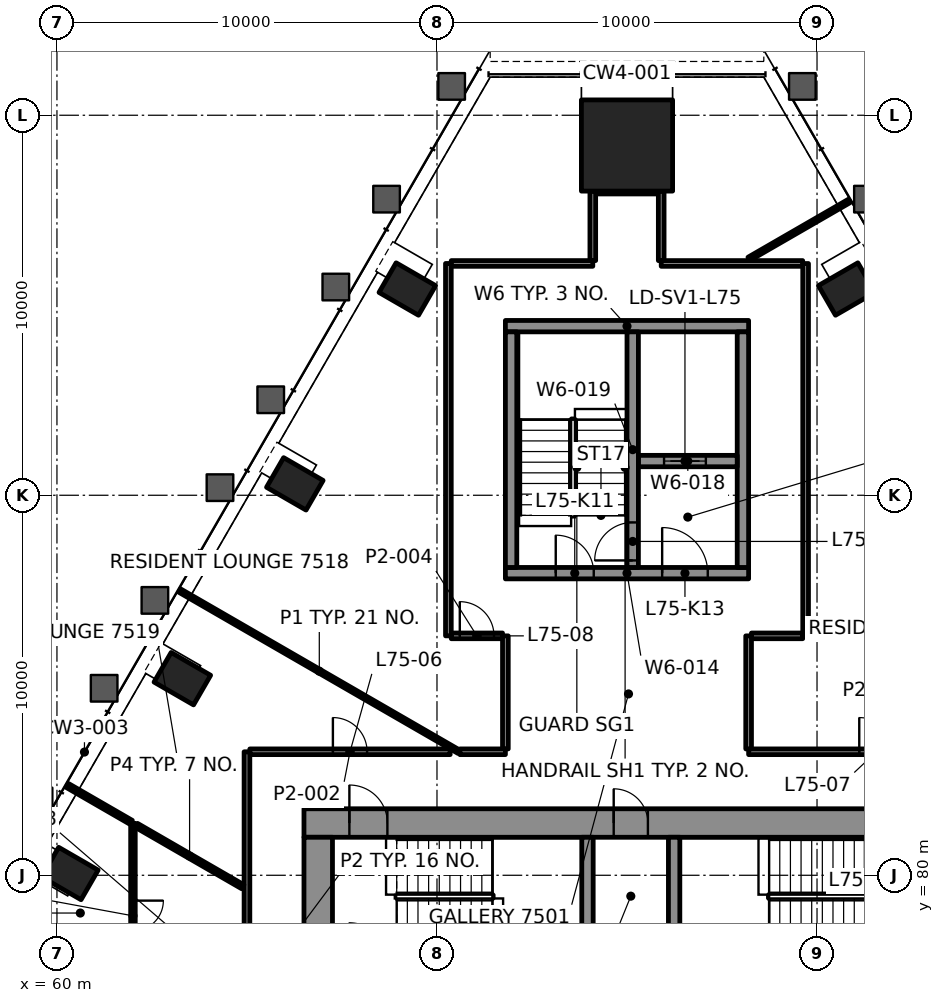
"""IFC4 building model, lengths in metres.
Left out: names, types, materials, properties, quantities, classifications, styles, units other than length and angle.
Written with IfcOpenShell. Run it as: python <this file> out.ifc"""

import sys

from ifc_helpers import new_model, si_unit, direction, frame, frame_2d, origin, origin_2d, place, context, subcontext, project, spatial, rectangle, hollow_rectangle, extrude, element, fill, save


model = new_model("IFC4")
c1 = context("Model", 3, precision=1e-05, world=origin(), true_north=direction((0.0, 1.0)))
c2 = subcontext(c1, "Body", "Model", "MODEL_VIEW")
j1 = project(units=[si_unit("LENGTHUNIT", "METRE"), si_unit("PLANEANGLEUNIT", "RADIAN")], contexts=[c1])
p1 = place(None, origin())
s1 = spatial("IfcSite", under=j1, at=p1, CompositionType="ELEMENT")
p2 = place(p1, origin())
s2 = spatial("IfcBuilding", under=s1, at=p2, CompositionType="ELEMENT")
p3 = place(p2, frame((0.0, 0.0, 309.1)))
s3 = spatial("IfcBuildingStorey", under=s2, at=p3, CompositionType="ELEMENT", Elevation=309.1)
p4 = place(p3, frame((75.0, 99.204, 0.0), z_axis=(0.0, 0.0, 1.0), x_axis=(-1.0, 0.0, 0.0)))
e1 = element("IfcColumn", 1, at=p4, inside=s3, PredefinedType="COLUMN", context=c2, shape_type="SweptSolid", body=[
    extrude(rectangle(XDim=2.4, YDim=2.4, at=origin_2d()), origin(), (0.0, 0.0, 1.0), 3.5),
])
for number, where, z_axis, x_axis in (
    (2, (80.781, 95.427, -0.0), (0.0, 0.0, 1.0), (-0.5, 0.866, 0.0)),
    (3, (69.219, 95.427, -0.0), (0.0, 0.0, 1.0), (-0.5, -0.866, 0.0)),
    (4, (66.26, 90.3, -0.0), (0.0, 0.0, 1.0), (-0.5, -0.866, 0.0)),
    (5, (63.299, 85.173, -0.0), (0.0, 0.0, 1.0), (-0.5, -0.866, 0.0)),
    (6, (60.339, 80.046, -0.0), (0.0, 0.0, 1.0), (-0.5, -0.866, 0.0)),
):
    element("IfcColumn", number, at=place(p3, frame(where, z_axis=z_axis, x_axis=x_axis)), inside=s3, PredefinedType="COLUMN", context=c2, shape_type="SweptSolid", body=[
        extrude(hollow_rectangle(XDim=0.9, YDim=1.2, WallThickness=0.06, at=origin_2d()), origin(), (0.0, 0.0, 1.0), 3.5),
    ])
p5 = place(p3, frame((66.5, 81.375, 0.0), z_axis=(0.0, 0.0, 1.0), x_axis=(1.0, 0.0, 0.0)))
e7 = element("IfcWall", 7, at=p5, inside=s3, PredefinedType="SHEAR", context=c2, shape_type="SweptSolid", body=[
    extrude(rectangle(XDim=17.0, YDim=0.75, at=frame_2d((8.5, 0.0))), origin(), (0.0, 0.0, 1.0), 3.3),
])
p6 = place(p5, frame((1.195, 0.0, 0.0)))
e8 = element("IfcOpeningElement", 8, at=p6, cuts=e7, PredefinedType="OPENING", context=c2, shape_type="SweptSolid", body=[
    extrude(rectangle(XDim=1.0, YDim=2.1, at=frame_2d((0.5, 1.05))), frame((0.0, 0.385, 0.0), z_axis=(0.0, -1.0, 0.0), x_axis=(1.0, 0.0, 0.0)), (0.0, 0.0, 1.0), 0.77),
])
p7 = place(p5, frame((15.005, 0.0, 0.0)))
e9 = element("IfcOpeningElement", 9, at=p7, cuts=e7, PredefinedType="OPENING", context=c2, shape_type="SweptSolid", body=[
    extrude(rectangle(XDim=1.0, YDim=2.1, at=frame_2d((0.5, 1.05))), frame((0.0, 0.385, 0.0), z_axis=(0.0, -1.0, 0.0), x_axis=(1.0, 0.0, 0.0)), (0.0, 0.0, 1.0), 0.77),
])
p8 = place(p5, frame((8.15, 0.0, 0.0)))
e10 = element("IfcOpeningElement", 10, at=p8, cuts=e7, PredefinedType="OPENING", context=c2, shape_type="SweptSolid", body=[
    extrude(rectangle(XDim=0.9, YDim=2.1, at=frame_2d((0.45, 1.05))), frame((0.0, 0.385, 0.0), z_axis=(0.0, -1.0, 0.0), x_axis=(1.0, 0.0, 0.0)), (0.0, 0.0, 1.0), 0.77),
])
p9 = place(p3, frame((66.875, 69.0, 0.0), z_axis=(0.0, 0.0, 1.0), x_axis=(0.0, 1.0, 0.0)))
e11 = element("IfcWall", 11, at=p9, inside=s3, PredefinedType="SHEAR", context=c2, shape_type="SweptSolid", body=[
    extrude(rectangle(XDim=12.0, YDim=0.75, at=frame_2d((6.0, 0.0))), origin(), (0.0, 0.0, 1.0), 3.3),
])
p10 = place(p9, frame((3.7, 0.0, 0.0)))
e12 = element("IfcOpeningElement", 12, at=p10, cuts=e11, PredefinedType="OPENING", context=c2, shape_type="SweptSolid", body=[
    extrude(rectangle(XDim=1.2, YDim=2.1, at=frame_2d((0.6, 1.05))), frame((0.0, 0.385, 0.0), z_axis=(0.0, -1.0, 0.0), x_axis=(1.0, 0.0, 0.0)), (0.0, 0.0, 1.0), 0.77),
])
p11 = place(p9, frame((0.925, 0.0, 0.0)))
e13 = element("IfcOpeningElement", 13, at=p11, cuts=e11, PredefinedType="OPENING", context=c2, shape_type="SweptSolid", body=[
    extrude(rectangle(XDim=0.9, YDim=2.1, at=frame_2d((0.45, 1.05))), frame((0.0, 0.385, 0.0), z_axis=(0.0, -1.0, 0.0), x_axis=(1.0, 0.0, 0.0)), (0.0, 0.0, 1.0), 0.77),
])
for number, where, z_axis, x_axis in (
    (14, (73.96, 77.9, 0.0), (0.0, 0.0, 1.0), (0.0, 1.0, 0.0)),
    (15, (76.24, 77.9, 0.0), (0.0, 0.0, 1.0), (0.0, 1.0, 0.0)),
):
    element("IfcWall", number, at=place(p3, frame(where, z_axis=z_axis, x_axis=x_axis)), inside=s3, PredefinedType="SHEAR", context=c2, shape_type="SweptSolid", body=[
        extrude(rectangle(XDim=3.1, YDim=0.3, at=frame_2d((1.55, 0.0))), origin(), (0.0, 0.0, 1.0), 3.3),
    ])
p12 = place(p3, frame((71.8, 87.95, 0.0), z_axis=(0.0, 0.0, 1.0), x_axis=(1.0, 0.0, 0.0)))
e16 = element("IfcWall", 16, at=p12, inside=s3, PredefinedType="SHEAR", context=c2, shape_type="SweptSolid", body=[
    extrude(rectangle(XDim=6.4, YDim=0.3, at=frame_2d((3.2, 0.0))), origin(), (0.0, 0.0, 1.0), 3.3),
])
p13 = place(p12, frame((1.325, 0.0, 0.0)))
e17 = element("IfcOpeningElement", 17, at=p13, cuts=e16, PredefinedType="OPENING", context=c2, shape_type="SweptSolid", body=[
    extrude(rectangle(XDim=1.0, YDim=2.1, at=frame_2d((0.5, 1.05))), frame((0.0, 0.16, 0.0), z_axis=(0.0, -1.0, 0.0), x_axis=(1.0, 0.0, 0.0)), (0.0, 0.0, 1.0), 0.32),
])
p14 = place(p12, frame((4.125, 0.0, 0.0)))
e18 = element("IfcOpeningElement", 18, at=p14, cuts=e16, PredefinedType="OPENING", context=c2, shape_type="SweptSolid", body=[
    extrude(rectangle(XDim=1.2, YDim=2.1, at=frame_2d((0.6, 1.05))), frame((0.0, 0.16, 0.0), z_axis=(0.0, -1.0, 0.0), x_axis=(1.0, 0.0, 0.0)), (0.0, 0.0, 1.0), 0.32),
])
p15 = place(p3, frame((71.8, 94.45, 0.0), z_axis=(0.0, 0.0, 1.0), x_axis=(1.0, 0.0, 0.0)))
e19 = element("IfcWall", 19, at=p15, inside=s3, PredefinedType="SHEAR", context=c2, shape_type="SweptSolid", body=[
    extrude(rectangle(XDim=6.4, YDim=0.3, at=frame_2d((3.2, 0.0))), origin(), (0.0, 0.0, 1.0), 3.3),
])
for number, where, z_axis, x_axis in (
    (20, (71.95, 88.1, 0.0), (0.0, 0.0, 1.0), (0.0, 1.0, 0.0)),
    (21, (78.05, 88.1, 0.0), (0.0, 0.0, 1.0), (0.0, 1.0, 0.0)),
):
    element("IfcWall", number, at=place(p3, frame(where, z_axis=z_axis, x_axis=x_axis)), inside=s3, PredefinedType="SHEAR", context=c2, shape_type="SweptSolid", body=[
        extrude(rectangle(XDim=6.2, YDim=0.3, at=frame_2d((3.1, 0.0))), origin(), (0.0, 0.0, 1.0), 3.3),
    ])
p16 = place(p3, frame((75.3, 90.9, 0.0), z_axis=(0.0, 0.0, 1.0), x_axis=(1.0, 0.0, 0.0)))
e22 = element("IfcWall", 22, at=p16, inside=s3, PredefinedType="SHEAR", context=c2, shape_type="SweptSolid", body=[
    extrude(rectangle(XDim=2.6, YDim=0.3, at=frame_2d((1.3, 0.0))), origin(), (0.0, 0.0, 1.0), 3.3),
])
p17 = place(p16, frame((0.675, 0.0, 0.0)))
e23 = element("IfcOpeningElement", 23, at=p17, cuts=e22, PredefinedType="OPENING", context=c2, shape_type="SweptSolid", body=[
    extrude(rectangle(XDim=1.1, YDim=2.1, at=frame_2d((0.55, 1.05))), frame((0.0, 0.16, 0.0), z_axis=(0.0, -1.0, 0.0), x_axis=(1.0, 0.0, 0.0)), (0.0, 0.0, 1.0), 0.32),
])
p18 = place(p3, frame((75.15, 88.1, 0.0), z_axis=(0.0, 0.0, 1.0), x_axis=(0.0, 1.0, 0.0)))
e24 = element("IfcWall", 24, at=p18, inside=s3, PredefinedType="SHEAR", context=c2, shape_type="SweptSolid", body=[
    extrude(rectangle(XDim=6.2, YDim=0.3, at=frame_2d((3.1, 0.0))), origin(), (0.0, 0.0, 1.0), 3.3),
])
p19 = place(p18, frame((0.185, 0.0, 0.0)))
e25 = element("IfcOpeningElement", 25, at=p19, cuts=e24, PredefinedType="OPENING", context=c2, shape_type="SweptSolid", body=[
    extrude(rectangle(XDim=1.0, YDim=2.1, at=frame_2d((0.5, 1.05))), frame((0.0, 0.16, 0.0), z_axis=(0.0, -1.0, 0.0), x_axis=(1.0, 0.0, 0.0)), (0.0, 0.0, 1.0), 0.32),
])
p20 = place(p3, frame((65.075, 83.25, 0.0), z_axis=(0.0, 0.0, 1.0), x_axis=(1.0, 0.0, 0.0)))
e26 = element("IfcWall", 26, at=p20, inside=s3, PredefinedType="PARTITIONING", context=c2, shape_type="SweptSolid", body=[
    extrude(rectangle(XDim=5.271, YDim=0.15, at=frame_2d((2.636, 0.0))), origin(), (0.0, 0.0, 1.0), 2.7),
])
p21 = place(p20, frame((2.186, 0.0, 0.0)))
e27 = element("IfcOpeningElement", 27, at=p21, cuts=e26, PredefinedType="OPENING", context=c2, shape_type="SweptSolid", body=[
    extrude(rectangle(XDim=0.9, YDim=2.1, at=frame_2d((0.45, 1.05))), frame((0.0, 0.085, 0.0), z_axis=(0.0, -1.0, 0.0), x_axis=(1.0, 0.0, 0.0)), (0.0, 0.0, 1.0), 0.17),
])
p22 = place(p3, frame((78.2, 83.25, 0.0), z_axis=(0.0, 0.0, 1.0), x_axis=(1.0, 0.0, 0.0)))
e28 = element("IfcWall", 28, at=p22, inside=s3, PredefinedType="PARTITIONING", context=c2, shape_type="SweptSolid", body=[
    extrude(rectangle(XDim=6.723, YDim=0.15, at=frame_2d((3.362, 0.0))), origin(), (0.0, 0.0, 1.0), 2.7),
])
p23 = place(p22, frame((2.911, 0.0, 0.0)))
e29 = element("IfcOpeningElement", 29, at=p23, cuts=e28, PredefinedType="OPENING", context=c2, shape_type="SweptSolid", body=[
    extrude(rectangle(XDim=0.9, YDim=2.1, at=frame_2d((0.45, 1.05))), frame((0.0, 0.085, 0.0), z_axis=(0.0, -1.0, 0.0), x_axis=(1.0, 0.0, 0.0)), (0.0, 0.0, 1.0), 0.17),
])
p24 = place(p3, frame((70.375, 86.3, 0.0), z_axis=(0.0, 0.0, 1.0), x_axis=(1.0, 0.0, 0.0)))
e30 = element("IfcWall", 30, at=p24, inside=s3, PredefinedType="PARTITIONING", context=c2, shape_type="SweptSolid", body=[
    extrude(rectangle(XDim=1.349, YDim=0.15, at=frame_2d((0.675, 0.0))), origin(), (0.0, 0.0, 1.0), 2.7),
])
p25 = place(p24, frame((0.225, 0.0, 0.0)))
e31 = element("IfcOpeningElement", 31, at=p25, cuts=e30, PredefinedType="OPENING", context=c2, shape_type="SweptSolid", body=[
    extrude(rectangle(XDim=0.9, YDim=2.1, at=frame_2d((0.45, 1.05))), frame((0.0, 0.085, 0.0), z_axis=(0.0, -1.0, 0.0), x_axis=(1.0, 0.0, 0.0)), (0.0, 0.0, 1.0), 0.17),
])
p26 = place(p3, frame((78.275, 86.3, 0.0), z_axis=(0.0, 0.0, 1.0), x_axis=(1.0, 0.0, 0.0)))
e32 = element("IfcWall", 32, at=p26, inside=s3, PredefinedType="PARTITIONING", context=c2, shape_type="SweptSolid", body=[
    extrude(rectangle(XDim=1.348, YDim=0.15, at=frame_2d((0.674, 0.0))), origin(), (0.0, 0.0, 1.0), 2.7),
])
p27 = place(p3, frame((70.375, 96.1, 0.0), z_axis=(0.0, 0.0, 1.0), x_axis=(1.0, 0.0, 0.0)))
e33 = element("IfcWall", 33, at=p27, inside=s3, PredefinedType="PARTITIONING", context=c2, shape_type="SweptSolid", body=[
    extrude(rectangle(XDim=3.725, YDim=0.15, at=frame_2d((1.862, 0.0))), origin(), (0.0, 0.0, 1.0), 2.7),
])
p28 = place(p3, frame((75.9, 96.1, 0.0), z_axis=(0.0, 0.0, 1.0), x_axis=(1.0, 0.0, 0.0)))
e34 = element("IfcWall", 34, at=p28, inside=s3, PredefinedType="PARTITIONING", context=c2, shape_type="SweptSolid", body=[
    extrude(rectangle(XDim=3.723, YDim=0.15, at=frame_2d((1.862, 0.0))), origin(), (0.0, 0.0, 1.0), 2.7),
])
p29 = place(p3, frame((74.176, 98.004, 0.0), z_axis=(0.0, 0.0, 1.0), x_axis=(1.0, 0.0, 0.0)))
e35 = element("IfcWall", 35, at=p29, inside=s3, PredefinedType="PARTITIONING", context=c2, shape_type="SweptSolid", body=[
    extrude(rectangle(XDim=1.649, YDim=0.15, at=frame_2d((0.824, 0.0))), origin(), (0.0, 0.0, 1.0), 2.697),
])
p30 = place(p3, frame((78.208, 96.22, 0.0), z_axis=(0.0, 0.0, 1.0), x_axis=(0.866004412891, 0.500036355531, 0.0)))
e36 = element("IfcWall", 36, at=p30, inside=s3, PredefinedType="PARTITIONING", context=c2, shape_type="SweptSolid", body=[
    extrude(rectangle(XDim=3.052, YDim=0.1, at=frame_2d((1.526, 0.0))), origin(), (0.0, 0.0, 1.0), 2.7),
])
p31 = place(p3, frame((79.7, 86.302, 0.0), z_axis=(0.0, 0.0, 1.0), x_axis=(0.0, 1.0, 0.0)))
e37 = element("IfcWall", 37, at=p31, inside=s3, PredefinedType="PARTITIONING", context=c2, shape_type="SweptSolid", body=[
    extrude(rectangle(XDim=9.796, YDim=0.15, at=frame_2d((4.898, 0.0))), origin(), (0.0, 0.0, 1.0), 2.7),
])
p32 = place(p3, frame((78.2, 83.325, 0.0), z_axis=(0.0, 0.0, 1.0), x_axis=(0.0, 1.0, 0.0)))
e38 = element("IfcWall", 38, at=p32, inside=s3, PredefinedType="PARTITIONING", context=c2, shape_type="SweptSolid", body=[
    extrude(rectangle(XDim=2.975, YDim=0.15, at=frame_2d((1.488, 0.0))), origin(), (0.0, 0.0, 1.0), 2.7),
])
for number, where, z_axis, x_axis in (
    (39, (75.9, 96.175, 0.0), (0.0, 0.0, 1.0), (0.0, 1.0, 0.0)),
    (40, (74.1, 96.175, 0.0), (0.0, 0.0, 1.0), (0.0, 1.0, 0.0)),
):
    element("IfcWall", number, at=place(p3, frame(where, z_axis=z_axis, x_axis=x_axis)), inside=s3, PredefinedType="PARTITIONING", context=c2, shape_type="SweptSolid", body=[
        extrude(rectangle(XDim=1.828, YDim=0.15, at=frame_2d((0.914, 0.0))), origin(), (0.0, 0.0, 1.0), 2.7),
    ])
p33 = place(p3, frame((71.8, 83.325, 0.0), z_axis=(0.0, 0.0, 1.0), x_axis=(0.0, 1.0, 0.0)))
e41 = element("IfcWall", 41, at=p33, inside=s3, PredefinedType="PARTITIONING", context=c2, shape_type="SweptSolid", body=[
    extrude(rectangle(XDim=2.975, YDim=0.15, at=frame_2d((1.488, 0.0))), origin(), (0.0, 0.0, 1.0), 2.7),
])
p34 = place(p3, frame((70.3, 86.301, 0.0), z_axis=(0.0, 0.0, 1.0), x_axis=(0.0, 1.0, 0.0)))
e42 = element("IfcWall", 42, at=p34, inside=s3, PredefinedType="PARTITIONING", context=c2, shape_type="SweptSolid", body=[
    extrude(rectangle(XDim=9.799, YDim=0.15, at=frame_2d((4.899, 0.0))), origin(), (0.0, 0.0, 1.0), 2.7),
])
p35 = place(p3, frame((65.0, 70.266, 0.0), z_axis=(0.0, 0.0, 1.0), x_axis=(0.0, 1.0, 0.0)))
e43 = element("IfcWall", 43, at=p35, inside=s3, PredefinedType="PARTITIONING", context=c2, shape_type="SweptSolid", body=[
    extrude(rectangle(XDim=12.984, YDim=0.15, at=frame_2d((6.492, 0.0))), origin(), (0.0, 0.0, 1.0), 2.7),
])
p36 = place(p3, frame((62.0, 81.366, 0.0), z_axis=(0.0, 0.0, 1.0), x_axis=(0.0, -1.0, 0.0)))
e44 = element("IfcWall", 44, at=p36, inside=s3, PredefinedType="PARTITIONING", context=c2, shape_type="SweptSolid", body=[
    extrude(rectangle(XDim=9.299, YDim=0.12, at=frame_2d((4.649, 0.0))), origin(), (0.0, 0.0, 1.0), 2.7),
])
p37 = place(p36, frame((2.033, 0.0, 0.0)))
e45 = element("IfcOpeningElement", 45, at=p37, cuts=e44, PredefinedType="OPENING", context=c2, shape_type="SweptSolid", body=[
    extrude(rectangle(XDim=0.8, YDim=2.1, at=frame_2d((0.4, 1.05))), frame((0.0, 0.07, 0.0), z_axis=(0.0, -1.0, 0.0), x_axis=(1.0, 0.0, 0.0)), (0.0, 0.0, 1.0), 0.14),
])
p38 = place(p36, frame((6.8, 0.0, 0.0)))
e46 = element("IfcOpeningElement", 46, at=p38, cuts=e44, PredefinedType="OPENING", context=c2, shape_type="SweptSolid", body=[
    extrude(rectangle(XDim=0.9, YDim=2.1, at=frame_2d((0.45, 1.05))), frame((0.0, 0.07, 0.0), z_axis=(0.0, -1.0, 0.0), x_axis=(1.0, 0.0, 0.0)), (0.0, 0.0, 1.0), 0.14),
])
p39 = place(p3, frame((70.577, 83.25, 0.0), z_axis=(0.0, 0.0, 1.0), x_axis=(-0.866024577697, 0.500001430823, 0.0)))
e47 = element("IfcWall", 47, at=p39, inside=s3, PredefinedType="PARTITIONING", context=c2, shape_type="SweptSolid", body=[
    extrude(rectangle(XDim=8.484, YDim=0.1, at=frame_2d((4.242, 0.0))), origin(), (0.0, 0.0, 1.0), 2.688),
])
p40 = place(p3, frame((64.89, 79.697, 0.0), z_axis=(0.0, 0.0, 1.0), x_axis=(-0.866013313631, 0.500020940175, 0.0)))
e48 = element("IfcWall", 48, at=p40, inside=s3, PredefinedType="PARTITIONING", context=c2, shape_type="SweptSolid", body=[
    extrude(rectangle(XDim=3.233, YDim=0.12, at=frame_2d((1.617, 0.0))), origin(), (0.0, 0.0, 1.0), 2.7),
])
p41 = place(p3, frame((58.222, 78.819, 0.0), z_axis=(0.0, 0.0, 1.0), x_axis=(0.866017735387, -0.500013281819, 0.0)))
e49 = element("IfcWall", 49, at=p41, inside=s3, PredefinedType="PARTITIONING", context=c2, shape_type="SweptSolid", body=[
    extrude(rectangle(XDim=4.263, YDim=0.1, at=frame_2d((2.132, 0.0))), origin(), (0.0, 0.0, 1.0), 2.688),
])
p42 = place(p41, frame((1.991, 0.0, 0.0)))
e50 = element("IfcOpeningElement", 50, at=p42, cuts=e49, PredefinedType="OPENING", context=c2, shape_type="SweptSolid", body=[
    extrude(rectangle(XDim=0.9, YDim=2.1, at=frame_2d((0.45, 1.05))), frame((0.0, 0.06, 0.0), z_axis=(0.0, -1.0, 0.0), x_axis=(1.0, 0.0, 0.0)), (0.0, 0.0, 1.0), 0.12),
])
p43 = place(p3, frame((70.602, 83.25, 0.0), z_axis=(0.0, 0.0, 1.0), x_axis=(1.0, 0.0, 0.0)))
e51 = element("IfcWall", 51, at=p43, inside=s3, PredefinedType="PARTITIONING", context=c2, shape_type="SweptSolid", body=[
    extrude(rectangle(XDim=1.198, YDim=0.15, at=frame_2d((0.599, 0.0))), origin(), (0.0, 0.0, 1.0), 2.7),
])
p44 = place(p3, frame((61.955, 81.392, 0.0), z_axis=(0.0, 0.0, 1.0), x_axis=(-0.865995465643, 0.500051850797, 0.0)))
e52 = element("IfcWall", 52, at=p44, inside=s3, PredefinedType="PARTITIONING", context=c2, shape_type="SweptSolid", body=[
    extrude(rectangle(XDim=1.946, YDim=0.12, at=frame_2d((0.973, 0.0))), origin(), (0.0, 0.0, 1.0), 2.688),
])
p45 = place(p3, frame((78.6, 101.565, 0.0), z_axis=(0.0, 0.0, 1.0), x_axis=(-1.0, 0.0, 0.0)))
e53 = element("IfcWall", 53, at=p45, inside=s3, PredefinedType="PARAPET", context=c2, shape_type="SweptSolid", body=[
    extrude(rectangle(XDim=7.2, YDim=0.3, at=frame_2d((3.6, 0.0))), origin(), (0.0, 0.0, 1.0), 1.1),
])
p46 = place(p21, origin())
e54 = element("IfcDoor", 54, at=p46, inside=s3, OperationType="SINGLE_SWING_RIGHT", PredefinedType="DOOR", context=c2, shape_type="SweptSolid", body=[
    extrude(rectangle(XDim=0.9, YDim=2.1, at=frame_2d((0.45, 1.05))), frame((0.0, 0.025, 0.0), z_axis=(0.0, -1.0, 0.0), x_axis=(1.0, 0.0, 0.0)), (0.0, 0.0, 1.0), 0.05),
])
fill(e27, e54)
p47 = place(p23, origin())
e55 = element("IfcDoor", 55, at=p47, inside=s3, OperationType="SINGLE_SWING_RIGHT", PredefinedType="DOOR", context=c2, shape_type="SweptSolid", body=[
    extrude(rectangle(XDim=0.9, YDim=2.1, at=frame_2d((0.45, 1.05))), frame((0.0, 0.025, 0.0), z_axis=(0.0, -1.0, 0.0), x_axis=(1.0, 0.0, 0.0)), (0.0, 0.0, 1.0), 0.05),
])
fill(e29, e55)
p48 = place(p25, origin())
e56 = element("IfcDoor", 56, at=p48, inside=s3, OperationType="SINGLE_SWING_LEFT", PredefinedType="DOOR", context=c2, shape_type="SweptSolid", body=[
    extrude(rectangle(XDim=0.9, YDim=2.1, at=frame_2d((0.45, 1.05))), frame((0.0, 0.025, 0.0), z_axis=(0.0, -1.0, 0.0), x_axis=(1.0, 0.0, 0.0)), (0.0, 0.0, 1.0), 0.05),
])
fill(e31, e56)
p49 = place(p37, origin())
e57 = element("IfcDoor", 57, at=p49, inside=s3, OperationType="SINGLE_SWING_RIGHT", PredefinedType="DOOR", context=c2, shape_type="SweptSolid", body=[
    extrude(rectangle(XDim=0.8, YDim=2.1, at=frame_2d((0.4, 1.05))), frame((0.0, 0.025, 0.0), z_axis=(0.0, -1.0, 0.0), x_axis=(1.0, 0.0, 0.0)), (0.0, 0.0, 1.0), 0.05),
])
fill(e45, e57)
p50 = place(p17, origin())
e58 = element("IfcDoor", 58, at=p50, inside=s3, OperationType="DOUBLE_DOOR_SLIDING", PredefinedType="DOOR", context=c2, shape_type="SweptSolid", body=[
    extrude(rectangle(XDim=1.1, YDim=2.1, at=frame_2d((0.55, 1.05))), frame((0.0, 0.025, 0.0), z_axis=(0.0, -1.0, 0.0), x_axis=(1.0, 0.0, 0.0)), (0.0, 0.0, 1.0), 0.05),
])
fill(e23, e58)
p51 = place(p6, origin())
e59 = element("IfcDoor", 59, at=p51, inside=s3, OperationType="SINGLE_SWING_RIGHT", PredefinedType="DOOR", context=c2, shape_type="SweptSolid", body=[
    extrude(rectangle(XDim=1.0, YDim=2.1, at=frame_2d((0.5, 1.05))), frame((0.0, 0.095, 0.0), z_axis=(0.0, -1.0, 0.0), x_axis=(1.0, 0.0, 0.0)), (0.0, 0.0, 1.0), 0.19),
])
fill(e8, e59)
p52 = place(p13, origin())
e60 = element("IfcDoor", 60, at=p52, inside=s3, OperationType="SINGLE_SWING_RIGHT", PredefinedType="DOOR", context=c2, shape_type="SweptSolid", body=[
    extrude(rectangle(XDim=1.0, YDim=2.1, at=frame_2d((0.5, 1.05))), frame((0.0, 0.025, 0.0), z_axis=(0.0, -1.0, 0.0), x_axis=(1.0, 0.0, 0.0)), (0.0, 0.0, 1.0), 0.05),
])
fill(e17, e60)
p53 = place(p19, origin())
e61 = element("IfcDoor", 61, at=p53, inside=s3, OperationType="SINGLE_SWING_LEFT", PredefinedType="DOOR", context=c2, shape_type="SweptSolid", body=[
    extrude(rectangle(XDim=1.0, YDim=2.1, at=frame_2d((0.5, 1.05))), frame((0.0, 0.025, 0.0), z_axis=(0.0, -1.0, 0.0), x_axis=(1.0, 0.0, 0.0)), (0.0, 0.0, 1.0), 0.05),
])
fill(e25, e61)
p54 = place(p14, origin())
e62 = element("IfcDoor", 62, at=p54, inside=s3, OperationType="SINGLE_SWING_RIGHT", PredefinedType="DOOR", context=c2, shape_type="SweptSolid", body=[
    extrude(rectangle(XDim=1.2, YDim=2.1, at=frame_2d((0.6, 1.05))), frame((0.0, 0.025, 0.0), z_axis=(0.0, -1.0, 0.0), x_axis=(1.0, 0.0, 0.0)), (0.0, 0.0, 1.0), 0.05),
])
fill(e18, e62)
p55 = place(p8, origin())
e63 = element("IfcDoor", 63, at=p55, inside=s3, OperationType="SINGLE_SWING_RIGHT", PredefinedType="DOOR", context=c2, shape_type="SweptSolid", body=[
    extrude(rectangle(XDim=0.9, YDim=2.1, at=frame_2d((0.45, 1.05))), frame((0.0, 0.095, 0.0), z_axis=(0.0, -1.0, 0.0), x_axis=(1.0, 0.0, 0.0)), (0.0, 0.0, 1.0), 0.19),
])
fill(e10, e63)
save(model, sys.argv[1])
